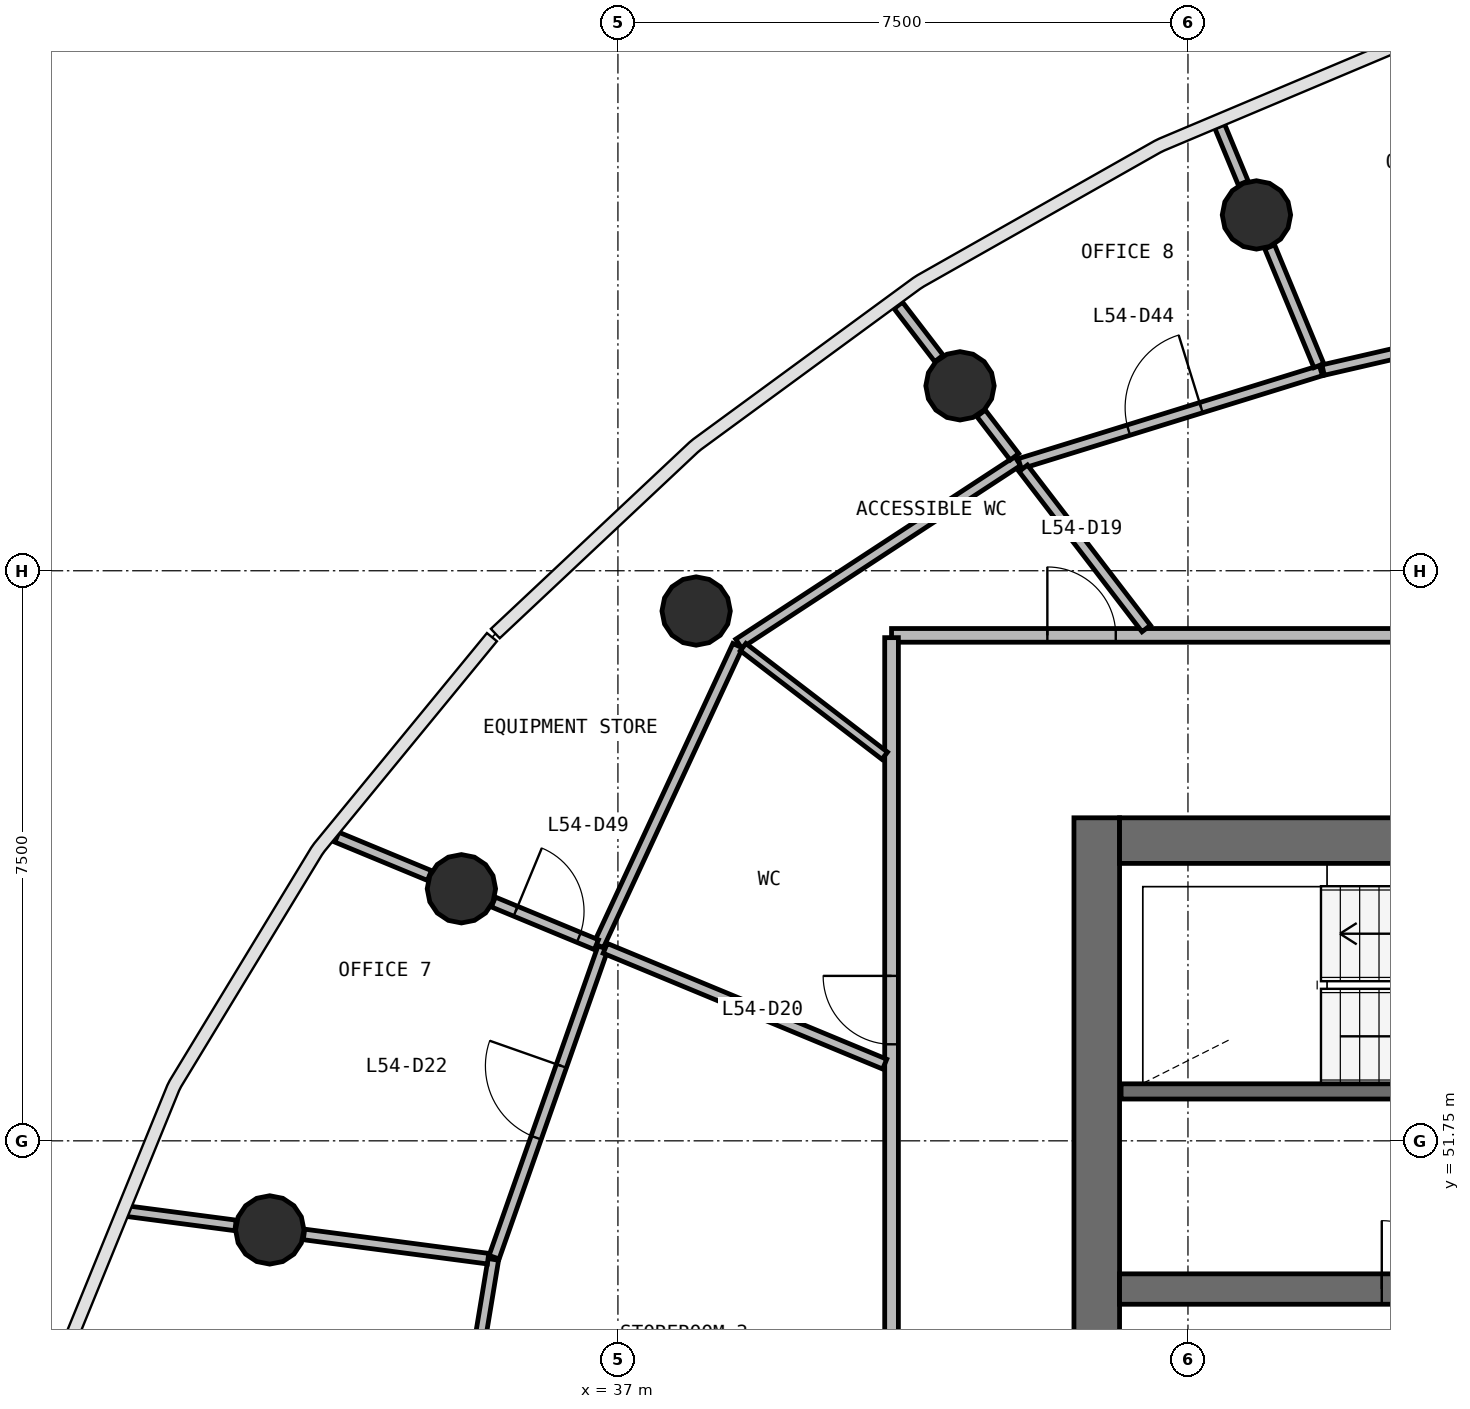
"""IFC4 building model, lengths in metres.
Left out: names, types, materials, properties, quantities, classifications, styles, units other than length and angle.
Written with IfcOpenShell. Run it as: python <this file> out.ifc"""

import sys

from ifc_helpers import new_model, si_unit, direction, frame, frame_2d, origin, origin_2d, place, context, subcontext, project, spatial, rectangle, circle, extrude, source, transform, mapped, element, fill, save


model = new_model("IFC4")
c1 = context("Model", 3, precision=1e-05, world=origin(), true_north=direction((0.0, 1.0)))
c2 = subcontext(c1, "Body", "Model", "MODEL_VIEW")
j1 = project(units=[si_unit("LENGTHUNIT", "METRE"), si_unit("PLANEANGLEUNIT", "RADIAN")], contexts=[c1])
p1 = place(None, origin())
s1 = spatial("IfcSite", under=j1, at=p1, CompositionType="ELEMENT")
p2 = place(p1, origin())
s2 = spatial("IfcBuilding", under=s1, at=p2, CompositionType="ELEMENT")
p3 = place(p2, frame((0.0, 0.0, 222.8)))
s3 = spatial("IfcBuildingStorey", under=s2, at=p3, CompositionType="ELEMENT", Elevation=222.8)
p4 = place(p3, frame((43.3, 56.0, 0.0), z_axis=(0.0, 0.0, 1.0), x_axis=(0.0, -1.0, 0.0)))
e1 = element("IfcWall", 1, at=p4, inside=s3, PredefinedType="SHEAR", context=c2, shape_type="SweptSolid", body=[
    extrude(rectangle(XDim=16.0, YDim=0.6, at=frame_2d((8.0, 0.0))), origin(), (0.0, 0.0, 1.0), 3.9),
])
p5 = place(p4, frame((7.1, 0.0, 0.0)))
e2 = element("IfcOpeningElement", 2, at=p5, cuts=e1, PredefinedType="OPENING", context=c2, shape_type="SweptSolid", body=[
    extrude(rectangle(XDim=1.8, YDim=2.1, at=frame_2d((0.9, 1.05))), frame((0.0, 0.31, 0.0), z_axis=(0.0, -1.0, 0.0), x_axis=(1.0, 0.0, 0.0)), (0.0, 0.0, 1.0), 0.62),
])
p6 = place(p3, frame((60.4, 55.7, 0.0), z_axis=(0.0, 0.0, 1.0), x_axis=(-1.0, 0.0, 0.0)))
e3 = element("IfcWall", 3, at=p6, inside=s3, PredefinedType="SHEAR", context=c2, shape_type="SweptSolid", body=[
    extrude(rectangle(XDim=16.8, YDim=0.6, at=frame_2d((8.4, 0.0))), origin(), (0.0, 0.0, 1.0), 3.9),
])
p7 = place(p6, frame((0.4, 0.0, 0.0)))
e4 = element("IfcOpeningElement", 4, at=p7, cuts=e3, PredefinedType="OPENING", context=c2, shape_type="SweptSolid", body=[
    extrude(rectangle(XDim=1.1, YDim=2.1, at=frame_2d((0.55, 1.05))), frame((0.0, 0.31, 0.0), z_axis=(0.0, -1.0, 0.0), x_axis=(1.0, 0.0, 0.0)), (0.0, 0.0, 1.0), 0.62),
])
p8 = place(p6, frame((10.3, 0.0, 0.0)))
e5 = element("IfcOpeningElement", 5, at=p8, cuts=e3, PredefinedType="OPENING", context=c2, shape_type="SweptSolid", body=[
    extrude(rectangle(XDim=1.2, YDim=2.1, at=frame_2d((0.6, 1.05))), frame((0.0, 0.31, 0.0), z_axis=(0.0, -1.0, 0.0), x_axis=(1.0, 0.0, 0.0)), (0.0, 0.0, 1.0), 0.62),
])
p9 = place(p6, frame((7.25, 0.0, 0.0)))
e6 = element("IfcOpeningElement", 6, at=p9, cuts=e3, PredefinedType="OPENING", context=c2, shape_type="SweptSolid", body=[
    extrude(rectangle(XDim=1.1, YDim=2.1, at=frame_2d((0.55, 1.05))), frame((0.0, 0.31, 0.0), z_axis=(0.0, -1.0, 0.0), x_axis=(1.0, 0.0, 0.0)), (0.0, 0.0, 1.0), 0.62),
])
p10 = place(p3, frame((43.6, 49.8, 0.0), z_axis=(0.0, 0.0, 1.0), x_axis=(1.0, 0.0, 0.0)))
e7 = element("IfcWall", 7, at=p10, inside=s3, PredefinedType="SHEAR", context=c2, shape_type="SweptSolid", body=[
    extrude(rectangle(XDim=16.8, YDim=0.4, at=frame_2d((8.4, 0.0))), origin(), (0.0, 0.0, 1.0), 3.9),
])
p11 = place(p10, frame((9.8, 0.0, 0.0)))
e8 = element("IfcOpeningElement", 8, at=p11, cuts=e7, PredefinedType="OPENING", context=c2, shape_type="SweptSolid", body=[
    extrude(rectangle(XDim=1.1, YDim=2.1, at=frame_2d((0.55, 1.05))), frame((0.0, 0.21, 0.0), z_axis=(0.0, -1.0, 0.0), x_axis=(1.0, 0.0, 0.0)), (0.0, 0.0, 1.0), 0.42),
])
p12 = place(p10, frame((12.3, 0.0, 0.0)))
e9 = element("IfcOpeningElement", 9, at=p12, cuts=e7, PredefinedType="OPENING", context=c2, shape_type="SweptSolid", body=[
    extrude(rectangle(XDim=1.1, YDim=2.1, at=frame_2d((0.55, 1.05))), frame((0.0, 0.21, 0.0), z_axis=(0.0, -1.0, 0.0), x_axis=(1.0, 0.0, 0.0)), (0.0, 0.0, 1.0), 0.42),
])
p13 = place(p10, frame((14.8, 0.0, 0.0)))
e10 = element("IfcOpeningElement", 10, at=p13, cuts=e7, PredefinedType="OPENING", context=c2, shape_type="SweptSolid", body=[
    extrude(rectangle(XDim=1.1, YDim=2.1, at=frame_2d((0.55, 1.05))), frame((0.0, 0.21, 0.0), z_axis=(0.0, -1.0, 0.0), x_axis=(1.0, 0.0, 0.0)), (0.0, 0.0, 1.0), 0.42),
])
p14 = place(p10, frame((3.45, 0.0, 0.0)))
e11 = element("IfcOpeningElement", 11, at=p14, cuts=e7, PredefinedType="OPENING", context=c2, shape_type="SweptSolid", body=[
    extrude(rectangle(XDim=0.9, YDim=2.1, at=frame_2d((0.45, 1.05))), frame((0.0, 0.21, 0.0), z_axis=(0.0, -1.0, 0.0), x_axis=(1.0, 0.0, 0.0)), (0.0, 0.0, 1.0), 0.42),
])
p15 = place(p10, frame((7.85, 0.0, 0.0)))
e12 = element("IfcOpeningElement", 12, at=p15, cuts=e7, PredefinedType="OPENING", context=c2, shape_type="SweptSolid", body=[
    extrude(rectangle(XDim=0.9, YDim=2.1, at=frame_2d((0.45, 1.05))), frame((0.0, 0.21, 0.0), z_axis=(0.0, -1.0, 0.0), x_axis=(1.0, 0.0, 0.0)), (0.0, 0.0, 1.0), 0.42),
])
m1 = source(origin(), c2, "Body", "SweptSolid", [
    extrude(circle(Radius=0.45, at=origin_2d()), origin(), (0.0, 0.0, 1.0), 3.9),
])
for number, where, z_axis, x_axis in (
    (13, (45.401, 63.931, 0.0), (0.0, 0.0, 1.0), (1.0, 0.0, 0.0)),
    (14, (41.501, 61.683, 0.0), (0.0, 0.0, 1.0), (1.0, 0.0, 0.0)),
    (15, (38.029, 58.72, 0.0), (0.0, 0.0, 1.0), (1.0, 0.0, 0.0)),
    (16, (34.941, 55.066, 0.0), (0.0, 0.0, 1.0), (1.0, 0.0, 0.0)),
    (17, (32.419, 50.578, 0.0), (0.0, 0.0, 1.0), (1.0, 0.0, 0.0)),
):
    element("IfcColumn", number, at=place(p3, frame(where, z_axis=z_axis, x_axis=x_axis)), inside=s3, PredefinedType="COLUMN", context=c2, shape_type="MappedRepresentation", body=[
        mapped(m1, transform((0.0, 0.0, 0.0), scale=1.0)),
    ])
p16 = place(p3, frame((43.62, 52.4, 0.0), z_axis=(0.0, 0.0, 1.0), x_axis=(1.0, 0.0, 0.0)))
e18 = element("IfcWall", 18, at=p16, inside=s3, PredefinedType="SOLIDWALL", context=c2, shape_type="SweptSolid", body=[
    extrude(rectangle(XDim=6.78, YDim=0.2, at=frame_2d((3.39, 0.0))), origin(), (0.0, 0.0, 1.0), 3.58),
])
p17 = place(p3, frame((40.6, 58.4, 0.0), z_axis=(0.0, 0.0, 1.0), x_axis=(1.0, 0.0, 0.0)))
e19 = element("IfcWall", 19, at=p17, inside=s3, PredefinedType="PARTITIONING", context=c2, shape_type="SweptSolid", body=[
    extrude(rectangle(XDim=22.8, YDim=0.18, at=frame_2d((11.4, 0.0))), origin(), (0.0, 0.0, 1.0), 2.88),
])
p18 = place(p17, frame((2.05, 0.0, 0.0)))
e20 = element("IfcOpeningElement", 20, at=p18, cuts=e19, PredefinedType="OPENING", context=c2, shape_type="SweptSolid", body=[
    extrude(rectangle(XDim=0.9, YDim=2.1, at=frame_2d((0.45, 1.05))), frame((0.0, 0.1, 0.0), z_axis=(0.0, -1.0, 0.0), x_axis=(1.0, 0.0, 0.0)), (0.0, 0.0, 1.0), 0.2),
])
p19 = place(p17, frame((12.95, 0.0, 0.0)))
e21 = element("IfcOpeningElement", 21, at=p19, cuts=e19, PredefinedType="OPENING", context=c2, shape_type="SweptSolid", body=[
    extrude(rectangle(XDim=1.0, YDim=2.1, at=frame_2d((0.5, 1.05))), frame((0.0, 0.1, 0.0), z_axis=(0.0, -1.0, 0.0), x_axis=(1.0, 0.0, 0.0)), (0.0, 0.0, 1.0), 0.2),
])
p20 = place(p17, frame((10.95, 0.0, 0.0)))
e22 = element("IfcOpeningElement", 22, at=p20, cuts=e19, PredefinedType="OPENING", context=c2, shape_type="SweptSolid", body=[
    extrude(rectangle(XDim=1.0, YDim=2.1, at=frame_2d((0.5, 1.05))), frame((0.0, 0.1, 0.0), z_axis=(0.0, -1.0, 0.0), x_axis=(1.0, 0.0, 0.0)), (0.0, 0.0, 1.0), 0.2),
])
p21 = place(p3, frame((40.6, 37.63, 0.0), z_axis=(0.0, 0.0, 1.0), x_axis=(0.0, 1.0, 0.0)))
e23 = element("IfcWall", 23, at=p21, inside=s3, PredefinedType="PARTITIONING", context=c2, shape_type="SweptSolid", body=[
    extrude(rectangle(XDim=20.74, YDim=0.18, at=frame_2d((10.37, 0.0))), origin(), (0.0, 0.0, 1.0), 2.88),
])
p22 = place(p21, frame((15.39, 0.0, 0.0)))
e24 = element("IfcOpeningElement", 24, at=p22, cuts=e23, PredefinedType="OPENING", context=c2, shape_type="SweptSolid", body=[
    extrude(rectangle(XDim=0.9, YDim=2.1, at=frame_2d((0.45, 1.05))), frame((0.0, 0.1, 0.0), z_axis=(0.0, -1.0, 0.0), x_axis=(1.0, 0.0, 0.0)), (0.0, 0.0, 1.0), 0.2),
])
p23 = place(p21, frame((9.89, 0.0, 0.0)))
e25 = element("IfcOpeningElement", 25, at=p23, cuts=e23, PredefinedType="OPENING", context=c2, shape_type="SweptSolid", body=[
    extrude(rectangle(XDim=1.0, YDim=2.1, at=frame_2d((0.5, 1.05))), frame((0.0, 0.1, 0.0), z_axis=(0.0, -1.0, 0.0), x_axis=(1.0, 0.0, 0.0)), (0.0, 0.0, 1.0), 0.2),
])
p24 = place(p21, frame((7.69, 0.0, 0.0)))
e26 = element("IfcOpeningElement", 26, at=p24, cuts=e23, PredefinedType="OPENING", context=c2, shape_type="SweptSolid", body=[
    extrude(rectangle(XDim=1.0, YDim=2.1, at=frame_2d((0.5, 1.05))), frame((0.0, 0.1, 0.0), z_axis=(0.0, -1.0, 0.0), x_axis=(1.0, 0.0, 0.0)), (0.0, 0.0, 1.0), 0.2),
])
p25 = place(p3, frame((34.62, 45.712, 0.0), z_axis=(0.0, 0.0, 1.0), x_axis=(0.163116833083, 0.986606759943, 0.0)))
e27 = element("IfcWall", 27, at=p25, inside=s3, PredefinedType="PARTITIONING", context=c2, shape_type="SweptSolid", body=[
    extrude(rectangle(XDim=4.54, YDim=0.14, at=frame_2d((2.27, 0.0))), origin(), (0.0, 0.0, 1.0), 2.88),
])
p26 = place(p25, frame((1.689, 0.0, 0.0)))
e28 = element("IfcOpeningElement", 28, at=p26, cuts=e27, PredefinedType="OPENING", context=c2, shape_type="SweptSolid", body=[
    extrude(rectangle(XDim=1.0, YDim=2.1, at=frame_2d((0.5, 1.05))), frame((0.0, 0.08, 0.0), z_axis=(0.0, -1.0, 0.0), x_axis=(1.0, 0.0, 0.0)), (0.0, 0.0, 1.0), 0.16),
])
p27 = place(p3, frame((42.26, 60.694, 0.0), z_axis=(0.0, 0.0, 1.0), x_axis=(-0.836812752169, -0.547489194238, 0.0)))
e29 = element("IfcWall", 29, at=p27, inside=s3, PredefinedType="PARTITIONING", context=c2, shape_type="SweptSolid", body=[
    extrude(rectangle(XDim=4.388, YDim=0.14, at=frame_2d((2.194, 0.0))), origin(), (0.0, 0.0, 1.0), 2.88),
])
p28 = place(p3, frame((38.576, 58.264, 0.0), z_axis=(0.0, 0.0, 1.0), x_axis=(-0.421068424285, -0.907028876095, 0.0)))
e30 = element("IfcWall", 30, at=p28, inside=s3, PredefinedType="PARTITIONING", context=c2, shape_type="SweptSolid", body=[
    extrude(rectangle(XDim=4.349, YDim=0.14, at=frame_2d((2.175, 0.0))), origin(), (0.0, 0.0, 1.0), 2.88),
])
p29 = place(p3, frame((35.371, 50.219, 0.0), z_axis=(0.0, 0.0, 1.0), x_axis=(0.331994733927, 0.943281239421, 0.0)))
e31 = element("IfcWall", 31, at=p29, inside=s3, PredefinedType="PARTITIONING", context=c2, shape_type="SweptSolid", body=[
    extrude(rectangle(XDim=4.317, YDim=0.14, at=frame_2d((2.159, 0.0))), origin(), (0.0, 0.0, 1.0), 2.88),
])
p30 = place(p29, frame((1.667, 0.0, 0.0)))
e32 = element("IfcOpeningElement", 32, at=p30, cuts=e31, PredefinedType="OPENING", context=c2, shape_type="SweptSolid", body=[
    extrude(rectangle(XDim=1.0, YDim=2.1, at=frame_2d((0.5, 1.05))), frame((0.0, 0.08, 0.0), z_axis=(0.0, -1.0, 0.0), x_axis=(1.0, 0.0, 0.0)), (0.0, 0.0, 1.0), 0.16),
])
p31 = place(p3, frame((42.287, 60.658, 0.0), z_axis=(0.0, 0.0, 1.0), x_axis=(0.955334971009, 0.295525114276, 0.0)))
e33 = element("IfcWall", 33, at=p31, inside=s3, PredefinedType="PARTITIONING", context=c2, shape_type="SweptSolid", body=[
    extrude(rectangle(XDim=4.147, YDim=0.14, at=frame_2d((2.074, 0.0))), origin(), (0.0, 0.0, 1.0), 2.88),
])
p32 = place(p31, frame((1.497, 0.0, 0.0)))
e34 = element("IfcOpeningElement", 34, at=p32, cuts=e33, PredefinedType="OPENING", context=c2, shape_type="SweptSolid", body=[
    extrude(rectangle(XDim=1.0, YDim=2.1, at=frame_2d((0.5, 1.05))), frame((0.0, 0.08, 0.0), z_axis=(0.0, -1.0, 0.0), x_axis=(1.0, 0.0, 0.0)), (0.0, 0.0, 1.0), 0.16),
])
p33 = place(p3, frame((40.51, 52.759, 0.0), z_axis=(0.0, 0.0, 1.0), x_axis=(-0.923877031545, 0.382689470177, 0.0)))
e35 = element("IfcWall", 35, at=p33, inside=s3, PredefinedType="PARTITIONING", context=c2, shape_type="SweptSolid", body=[
    extrude(rectangle(XDim=3.98, YDim=0.14, at=frame_2d((1.99, 0.0))), origin(), (0.0, 0.0, 1.0), 2.88),
])
p34 = place(p3, frame((46.279, 61.89, 0.0), z_axis=(0.0, 0.0, 1.0), x_axis=(0.974383708643, 0.224891948123, 0.0)))
e36 = element("IfcWall", 36, at=p34, inside=s3, PredefinedType="PARTITIONING", context=c2, shape_type="SweptSolid", body=[
    extrude(rectangle(XDim=3.847, YDim=0.14, at=frame_2d((1.924, 0.0))), origin(), (0.0, 0.0, 1.0), 2.88),
])
p35 = place(p34, frame((1.397, 0.0, 0.0)))
e37 = element("IfcOpeningElement", 37, at=p35, cuts=e36, PredefinedType="OPENING", context=c2, shape_type="SweptSolid", body=[
    extrude(rectangle(XDim=1.0, YDim=2.1, at=frame_2d((0.5, 1.05))), frame((0.0, 0.08, 0.0), z_axis=(0.0, -1.0, 0.0), x_axis=(1.0, 0.0, 0.0)), (0.0, 0.0, 1.0), 0.16),
])
p36 = place(p3, frame((43.951, 58.49, 0.0), z_axis=(0.0, 0.0, 1.0), x_axis=(-0.608724660366, 0.793381552509, 0.0)))
e38 = element("IfcWall", 38, at=p36, inside=s3, PredefinedType="PARTITIONING", context=c2, shape_type="SweptSolid", body=[
    extrude(rectangle(XDim=2.657, YDim=0.14, at=frame_2d((1.329, 0.0))), origin(), (0.0, 0.0, 1.0), 2.88),
])
p37 = place(p3, frame((35.291, 50.2, 0.0), z_axis=(0.0, 0.0, 1.0), x_axis=(-0.991443064915, 0.130539836957, 0.0)))
e39 = element("IfcWall", 39, at=p37, inside=s3, PredefinedType="PARTITIONING", context=c2, shape_type="SweptSolid", body=[
    extrude(rectangle(XDim=2.443, YDim=0.14, at=frame_2d((1.221, 0.0))), origin(), (0.0, 0.0, 1.0), 2.88),
])
p38 = place(p3, frame((46.222, 61.948, 0.0), z_axis=(0.0, 0.0, 1.0), x_axis=(-0.382636491463, 0.923898974672, 0.0)))
e40 = element("IfcWall", 40, at=p38, inside=s3, PredefinedType="PARTITIONING", context=c2, shape_type="SweptSolid", body=[
    extrude(rectangle(XDim=1.691, YDim=0.14, at=frame_2d((0.846, 0.0))), origin(), (0.0, 0.0, 1.0), 2.88),
])
p39 = place(p3, frame((35.361, 54.892, 0.0), z_axis=(0.0, 0.0, 1.0), x_axis=(0.923887056475, -0.382665267404, 0.0)))
e41 = element("IfcWall", 41, at=p39, inside=s3, PredefinedType="PARTITIONING", context=c2, shape_type="SweptSolid", body=[
    extrude(rectangle(XDim=1.467, YDim=0.14, at=frame_2d((0.734, 0.0))), origin(), (0.0, 0.0, 1.0), 2.88),
])
p40 = place(p39, frame((0.317, 0.0, 0.0)))
e42 = element("IfcOpeningElement", 42, at=p40, cuts=e41, PredefinedType="OPENING", context=c2, shape_type="SweptSolid", body=[
    extrude(rectangle(XDim=0.9, YDim=2.1, at=frame_2d((0.45, 1.05))), frame((0.0, 0.08, 0.0), z_axis=(0.0, -1.0, 0.0), x_axis=(1.0, 0.0, 0.0)), (0.0, 0.0, 1.0), 0.16),
])
p41 = place(p3, frame((31.969, 50.637, 0.0), z_axis=(0.0, 0.0, 1.0), x_axis=(-0.991438884998, 0.130571579275, 0.0)))
e43 = element("IfcWall", 43, at=p41, inside=s3, PredefinedType="PARTITIONING", context=c2, shape_type="SweptSolid", body=[
    extrude(rectangle(XDim=1.457, YDim=0.14, at=frame_2d((0.728, 0.0))), origin(), (0.0, 0.0, 1.0), 2.88),
])
p42 = place(p3, frame((34.52, 55.24, 0.0), z_axis=(0.0, 0.0, 1.0), x_axis=(-0.923901775897, 0.382629727666, 0.0)))
e44 = element("IfcWall", 44, at=p42, inside=s3, PredefinedType="PARTITIONING", context=c2, shape_type="SweptSolid", body=[
    extrude(rectangle(XDim=1.319, YDim=0.14, at=frame_2d((0.659, 0.0))), origin(), (0.0, 0.0, 1.0), 2.88),
])
p43 = place(p3, frame((41.224, 62.044, 0.0), z_axis=(0.0, 0.0, 1.0), x_axis=(-0.608973072877, 0.793190895378, 0.0)))
e45 = element("IfcWall", 45, at=p43, inside=s3, PredefinedType="PARTITIONING", context=c2, shape_type="SweptSolid", body=[
    extrude(rectangle(XDim=0.88, YDim=0.14, at=frame_2d((0.44, 0.0))), origin(), (0.0, 0.0, 1.0), 2.88),
])
p44 = place(p3, frame((45.227, 64.352, 0.0), z_axis=(0.0, 0.0, 1.0), x_axis=(-0.382556243331, 0.923932205678, 0.0)))
e46 = element("IfcWall", 46, at=p44, inside=s3, PredefinedType="PARTITIONING", context=c2, shape_type="SweptSolid", body=[
    extrude(rectangle(XDim=0.809, YDim=0.14, at=frame_2d((0.404, 0.0))), origin(), (0.0, 0.0, 1.0), 2.88),
])
p45 = place(p3, frame((42.217, 60.749, 0.0), z_axis=(0.0, 0.0, 1.0), x_axis=(-0.608615982895, 0.79346492384, 0.0)))
e47 = element("IfcWall", 47, at=p45, inside=s3, PredefinedType="PARTITIONING", context=c2, shape_type="SweptSolid", body=[
    extrude(rectangle(XDim=0.722, YDim=0.14, at=frame_2d((0.361, 0.0))), origin(), (0.0, 0.0, 1.0), 2.88),
])
p46 = place(p3, frame((40.51, 56.817, 0.0), z_axis=(0.0, 0.0, 1.0), x_axis=(-0.793338522039, 0.608780740044, 0.0)))
e48 = element("IfcWall", 48, at=p46, inside=s3, PredefinedType="PARTITIONING", context=c2, shape_type="SweptSolid", body=[
    extrude(rectangle(XDim=2.348, YDim=0.12, at=frame_2d((1.174, 0.0))), origin(), (0.0, 0.0, 1.0), 2.88),
])
m2 = source(origin(), c2, "Body", "SweptSolid", [
    extrude(rectangle(XDim=0.9, YDim=2.1, at=frame_2d((0.45, 1.05))), frame((0.0, 0.025, 0.0), z_axis=(0.0, -1.0, 0.0), x_axis=(1.0, 0.0, 0.0)), (0.0, 0.0, 1.0), 0.05),
])
p47 = place(p18, origin())
e49 = element("IfcDoor", 49, at=p47, inside=s3, OperationType="SINGLE_SWING_LEFT", PredefinedType="DOOR", context=c2, shape_type="MappedRepresentation", body=[
    mapped(m2, transform((0.0, 0.0, 0.0), scale=1.0)),
])
fill(e20, e49)
p48 = place(p22, origin())
e50 = element("IfcDoor", 50, at=p48, inside=s3, OperationType="SINGLE_SWING_RIGHT", PredefinedType="DOOR", context=c2, shape_type="MappedRepresentation", body=[
    mapped(m2, transform((0.0, 0.0, 0.0), scale=1.0)),
])
fill(e24, e50)
m3 = source(origin(), c2, "Body", "SweptSolid", [
    extrude(rectangle(XDim=1.0, YDim=2.1, at=frame_2d((0.5, 1.05))), frame((0.0, 0.025, 0.0), z_axis=(0.0, -1.0, 0.0), x_axis=(1.0, 0.0, 0.0)), (0.0, 0.0, 1.0), 0.05),
])
p49 = place(p30, origin())
e51 = element("IfcDoor", 51, at=p49, inside=s3, OperationType="SINGLE_SWING_RIGHT", PredefinedType="DOOR", context=c2, shape_type="MappedRepresentation", body=[
    mapped(m3, transform((0.0, 0.0, 0.0), scale=1.0)),
])
fill(e32, e51)
p50 = place(p32, origin())
e52 = element("IfcDoor", 52, at=p50, inside=s3, OperationType="SINGLE_SWING_RIGHT", PredefinedType="DOOR", context=c2, shape_type="MappedRepresentation", body=[
    mapped(m3, transform((0.0, 0.0, 0.0), scale=1.0)),
])
fill(e34, e52)
m4 = source(origin(), c2, "Body", "SweptSolid", [
    extrude(rectangle(XDim=0.9, YDim=2.1, at=frame_2d((0.45, 1.05))), frame((0.0, 0.025, 0.0), z_axis=(0.0, -1.0, 0.0), x_axis=(1.0, 0.0, 0.0)), (0.0, 0.0, 1.0), 0.05),
])
p51 = place(p14, origin())
e53 = element("IfcDoor", 53, at=p51, inside=s3, OperationType="SINGLE_SWING_LEFT", PredefinedType="DOOR", context=c2, shape_type="MappedRepresentation", body=[
    mapped(m4, transform((0.0, 0.0, 0.0), scale=1.0)),
])
fill(e11, e53)
m5 = source(origin(), c2, "Body", "SweptSolid", [
    extrude(rectangle(XDim=0.9, YDim=2.1, at=frame_2d((0.45, 1.05))), frame((0.0, 0.025, 0.0), z_axis=(0.0, -1.0, 0.0), x_axis=(1.0, 0.0, 0.0)), (0.0, 0.0, 1.0), 0.05),
])
p52 = place(p40, origin())
e54 = element("IfcDoor", 54, at=p52, inside=s3, OperationType="SINGLE_SWING_LEFT", PredefinedType="DOOR", context=c2, shape_type="MappedRepresentation", body=[
    mapped(m5, transform((0.0, 0.0, 0.0), scale=1.0)),
])
fill(e42, e54)
save(model, sys.argv[1])
